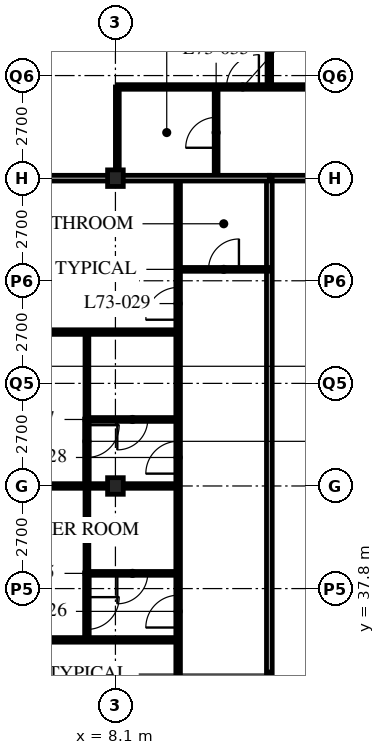
"""IFC4 building model, lengths in metres.
Left out: names, types, materials, properties, quantities, classifications, styles, units other than length and angle.
Written with IfcOpenShell. Run it as: python <this file> out.ifc"""

import sys

from ifc_helpers import new_model, si_unit, direction, frame, frame_2d, origin, origin_2d, place, context, subcontext, project, spatial, rectangle, i_section, extrude, element, fill, save


model = new_model("IFC4")
c1 = context("Model", 3, precision=1e-05, world=origin(), true_north=direction((0.0, 1.0)))
c2 = subcontext(c1, "Body", "Model", "MODEL_VIEW")
j1 = project(units=[si_unit("LENGTHUNIT", "METRE"), si_unit("PLANEANGLEUNIT", "RADIAN")], contexts=[c1])
p1 = place(None, origin())
s1 = spatial("IfcSite", under=j1, at=p1, CompositionType="ELEMENT")
p2 = place(p1, origin())
s2 = spatial("IfcBuilding", under=s1, at=p2, CompositionType="ELEMENT")
p3 = place(p2, frame((0.0, 0.0, 285.3)))
s3 = spatial("IfcBuildingStorey", under=s2, at=p3, CompositionType="ELEMENT", Elevation=285.3)
for number, where, z_axis, x_axis in (
    (1, (8.1, 40.5, 0.0), (0.0, 0.0, 1.0), (1.0, 0.0, 0.0)),
    (2, (8.1, 48.6, 0.0), (0.0, 0.0, 1.0), (1.0, 0.0, 0.0)),
):
    element("IfcColumn", number, at=place(p3, frame(where, z_axis=z_axis, x_axis=x_axis)), inside=s3, PredefinedType="COLUMN", context=c2, shape_type="SweptSolid", body=[
        extrude(i_section(OverallWidth=0.412, OverallDepth=0.437, WebThickness=0.036, FlangeThickness=0.058, FilletRadius=0.015, at=origin_2d()), origin(), (0.0, 0.0, 1.0), 3.9),
    ])
p4 = place(p3, frame((12.15, 48.6, 0.0), z_axis=(0.0, 0.0, 1.0), x_axis=(1.0, 0.0, 0.0)))
e3 = element("IfcWall", 3, at=p4, inside=s3, PredefinedType="PARTITIONING", context=c2, shape_type="SweptSolid", body=[
    extrude(rectangle(XDim=24.3, YDim=0.15, at=frame_2d((12.15, 0.0))), origin(), (0.0, 0.0, 1.0), 3.078),
])
p5 = place(p4, frame((4.95, 0.0, 0.0)))
e4 = element("IfcOpeningElement", 4, at=p5, cuts=e3, PredefinedType="OPENING", context=c2, shape_type="SweptSolid", body=[
    extrude(rectangle(XDim=1.0, YDim=2.1, at=frame_2d((0.5, 1.05))), frame((0.0, 0.085, 0.0), z_axis=(0.0, -1.0, 0.0), x_axis=(1.0, 0.0, 0.0)), (0.0, 0.0, 1.0), 0.17),
])
p6 = place(p4, frame((16.6, 0.0, 0.0)))
e5 = element("IfcOpeningElement", 5, at=p6, cuts=e3, PredefinedType="OPENING", context=c2, shape_type="SweptSolid", body=[
    extrude(rectangle(XDim=1.0, YDim=2.1, at=frame_2d((0.5, 1.05))), frame((0.0, 0.085, 0.0), z_axis=(0.0, -1.0, 0.0), x_axis=(1.0, 0.0, 0.0)), (0.0, 0.0, 1.0), 0.17),
])
p7 = place(p4, frame((1.525, 0.0, 0.0)))
e6 = element("IfcOpeningElement", 6, at=p7, cuts=e3, PredefinedType="OPENING", context=c2, shape_type="SweptSolid", body=[
    extrude(rectangle(XDim=1.0, YDim=2.1, at=frame_2d((0.5, 1.05))), frame((0.0, 0.085, 0.0), z_axis=(0.0, -1.0, 0.0), x_axis=(1.0, 0.0, 0.0)), (0.0, 0.0, 1.0), 0.17),
])
p8 = place(p3, frame((12.15, 22.5, 0.0), z_axis=(0.0, 0.0, 1.0), x_axis=(0.0, 1.0, 0.0)))
e7 = element("IfcWall", 7, at=p8, inside=s3, PredefinedType="PARTITIONING", context=c2, shape_type="SweptSolid", body=[
    extrude(rectangle(XDim=26.1, YDim=0.15, at=frame_2d((13.05, 0.0))), origin(), (0.0, 0.0, 1.0), 3.69),
])
p9 = place(p8, frame((0.4, 0.0, 0.0)))
e8 = element("IfcOpeningElement", 8, at=p9, cuts=e7, PredefinedType="OPENING", context=c2, shape_type="SweptSolid", body=[
    extrude(rectangle(XDim=1.0, YDim=2.1, at=frame_2d((0.5, 1.05))), frame((0.0, 0.085, 0.0), z_axis=(0.0, -1.0, 0.0), x_axis=(1.0, 0.0, 0.0)), (0.0, 0.0, 1.0), 0.17),
])
p10 = place(p3, frame((9.75, 22.5, 0.0), z_axis=(0.0, 0.0, 1.0), x_axis=(0.0, 1.0, 0.0)))
e9 = element("IfcWall", 9, at=p10, inside=s3, PredefinedType="PARTITIONING", context=c2, shape_type="SweptSolid", body=[
    extrude(rectangle(XDim=26.1, YDim=0.12, at=frame_2d((13.05, 0.0))), origin(), (0.0, 0.0, 1.0), 3.69),
])
p11 = place(p10, frame((0.975, 0.0, 0.0)))
e10 = element("IfcOpeningElement", 10, at=p11, cuts=e9, PredefinedType="OPENING", context=c2, shape_type="SweptSolid", body=[
    extrude(rectangle(XDim=0.85, YDim=2.1, at=frame_2d((0.425, 1.05))), frame((0.0, 0.07, 0.0), z_axis=(0.0, -1.0, 0.0), x_axis=(1.0, 0.0, 0.0)), (0.0, 0.0, 1.0), 0.14),
])
p12 = place(p10, frame((10.225, 0.0, 0.0)))
e11 = element("IfcOpeningElement", 11, at=p12, cuts=e9, PredefinedType="OPENING", context=c2, shape_type="SweptSolid", body=[
    extrude(rectangle(XDim=0.85, YDim=2.1, at=frame_2d((0.425, 1.05))), frame((0.0, 0.07, 0.0), z_axis=(0.0, -1.0, 0.0), x_axis=(1.0, 0.0, 0.0)), (0.0, 0.0, 1.0), 0.14),
])
p13 = place(p10, frame((14.275, 0.0, 0.0)))
e12 = element("IfcOpeningElement", 12, at=p13, cuts=e9, PredefinedType="OPENING", context=c2, shape_type="SweptSolid", body=[
    extrude(rectangle(XDim=0.85, YDim=2.1, at=frame_2d((0.425, 1.05))), frame((0.0, 0.07, 0.0), z_axis=(0.0, -1.0, 0.0), x_axis=(1.0, 0.0, 0.0)), (0.0, 0.0, 1.0), 0.14),
])
p14 = place(p10, frame((18.325, 0.0, 0.0)))
e13 = element("IfcOpeningElement", 13, at=p14, cuts=e9, PredefinedType="OPENING", context=c2, shape_type="SweptSolid", body=[
    extrude(rectangle(XDim=0.85, YDim=2.1, at=frame_2d((0.425, 1.05))), frame((0.0, 0.07, 0.0), z_axis=(0.0, -1.0, 0.0), x_axis=(1.0, 0.0, 0.0)), (0.0, 0.0, 1.0), 0.14),
])
p15 = place(p10, frame((22.375, 0.0, 0.0)))
e14 = element("IfcOpeningElement", 14, at=p15, cuts=e9, PredefinedType="OPENING", context=c2, shape_type="SweptSolid", body=[
    extrude(rectangle(XDim=0.85, YDim=2.1, at=frame_2d((0.425, 1.05))), frame((0.0, 0.07, 0.0), z_axis=(0.0, -1.0, 0.0), x_axis=(1.0, 0.0, 0.0)), (0.0, 0.0, 1.0), 0.14),
])
p16 = place(p3, frame((12.15, 46.2, 0.0), z_axis=(0.0, 0.0, 1.0), x_axis=(-1.0, 0.0, 0.0)))
e15 = element("IfcWall", 15, at=p16, inside=s3, PredefinedType="PARTITIONING", context=c2, shape_type="SweptSolid", body=[
    extrude(rectangle(XDim=2.4, YDim=0.1, at=frame_2d((1.2, 0.0))), origin(), (0.0, 0.0, 1.0), 3.69),
])
p17 = place(p16, frame((0.8, 0.0, 0.0)))
e16 = element("IfcOpeningElement", 16, at=p17, cuts=e15, PredefinedType="OPENING", context=c2, shape_type="SweptSolid", body=[
    extrude(rectangle(XDim=0.8, YDim=2.1, at=frame_2d((0.4, 1.05))), frame((0.0, 0.06, 0.0), z_axis=(0.0, -1.0, 0.0), x_axis=(1.0, 0.0, 0.0)), (0.0, 0.0, 1.0), 0.12),
])
p18 = place(p3, frame((9.75, 38.2, 0.0), z_axis=(0.0, 0.0, 1.0), x_axis=(-1.0, 0.0, 0.0)))
e17 = element("IfcWall", 17, at=p18, inside=s3, PredefinedType="PARTITIONING", context=c2, shape_type="SweptSolid", body=[
    extrude(rectangle(XDim=2.4, YDim=0.1, at=frame_2d((1.2, 0.0))), origin(), (0.0, 0.0, 1.0), 3.69),
])
p19 = place(p18, frame((0.8, 0.0, 0.0)))
e18 = element("IfcOpeningElement", 18, at=p19, cuts=e17, PredefinedType="OPENING", context=c2, shape_type="SweptSolid", body=[
    extrude(rectangle(XDim=0.8, YDim=2.1, at=frame_2d((0.4, 1.05))), frame((0.0, 0.06, 0.0), z_axis=(0.0, -1.0, 0.0), x_axis=(1.0, 0.0, 0.0)), (0.0, 0.0, 1.0), 0.12),
])
p20 = place(p3, frame((7.35, 38.2, 0.0), z_axis=(0.0, 0.0, 1.0), x_axis=(0.0, 1.0, 0.0)))
e19 = element("IfcWall", 19, at=p20, inside=s3, PredefinedType="PARTITIONING", context=c2, shape_type="SweptSolid", body=[
    extrude(rectangle(XDim=2.3, YDim=0.1, at=frame_2d((1.15, 0.0))), origin(), (0.0, 0.0, 1.0), 3.69),
])
p21 = place(p3, frame((9.75, 36.45, 0.0), z_axis=(0.0, 0.0, 1.0), x_axis=(-1.0, 0.0, 0.0)))
e20 = element("IfcWall", 20, at=p21, inside=s3, PredefinedType="PARTITIONING", context=c2, shape_type="SweptSolid", body=[
    extrude(rectangle(XDim=9.45, YDim=0.12, at=frame_2d((4.725, 0.0))), origin(), (0.0, 0.0, 1.0), 3.69),
])
p22 = place(p3, frame((9.75, 42.25, 0.0), z_axis=(0.0, 0.0, 1.0), x_axis=(-1.0, 0.0, 0.0)))
e21 = element("IfcWall", 21, at=p22, inside=s3, PredefinedType="PARTITIONING", context=c2, shape_type="SweptSolid", body=[
    extrude(rectangle(XDim=2.4, YDim=0.1, at=frame_2d((1.2, 0.0))), origin(), (0.0, 0.0, 1.0), 3.69),
])
p23 = place(p22, frame((0.8, 0.0, 0.0)))
e22 = element("IfcOpeningElement", 22, at=p23, cuts=e21, PredefinedType="OPENING", context=c2, shape_type="SweptSolid", body=[
    extrude(rectangle(XDim=0.8, YDim=2.1, at=frame_2d((0.4, 1.05))), frame((0.0, 0.06, 0.0), z_axis=(0.0, -1.0, 0.0), x_axis=(1.0, 0.0, 0.0)), (0.0, 0.0, 1.0), 0.12),
])
p24 = place(p3, frame((7.35, 42.25, 0.0), z_axis=(0.0, 0.0, 1.0), x_axis=(0.0, 1.0, 0.0)))
e23 = element("IfcWall", 23, at=p24, inside=s3, PredefinedType="PARTITIONING", context=c2, shape_type="SweptSolid", body=[
    extrude(rectangle(XDim=2.3, YDim=0.1, at=frame_2d((1.15, 0.0))), origin(), (0.0, 0.0, 1.0), 3.69),
])
p25 = place(p3, frame((9.75, 40.5, 0.0), z_axis=(0.0, 0.0, 1.0), x_axis=(-1.0, 0.0, 0.0)))
e24 = element("IfcWall", 24, at=p25, inside=s3, PredefinedType="PARTITIONING", context=c2, shape_type="SweptSolid", body=[
    extrude(rectangle(XDim=9.45, YDim=0.12, at=frame_2d((4.725, 0.0))), origin(), (0.0, 0.0, 1.0), 3.078),
])
p26 = place(p3, frame((9.75, 44.55, 0.0), z_axis=(0.0, 0.0, 1.0), x_axis=(-1.0, 0.0, 0.0)))
e25 = element("IfcWall", 25, at=p26, inside=s3, PredefinedType="PARTITIONING", context=c2, shape_type="SweptSolid", body=[
    extrude(rectangle(XDim=9.45, YDim=0.12, at=frame_2d((4.725, 0.0))), origin(), (0.0, 0.0, 1.0), 3.69),
])
p27 = place(p3, frame((10.75, 48.6, 0.0), z_axis=(0.0, 0.0, 1.0), x_axis=(0.0, 1.0, 0.0)))
e26 = element("IfcWall", 26, at=p27, inside=s3, PredefinedType="PARTITIONING", context=c2, shape_type="SweptSolid", body=[
    extrude(rectangle(XDim=2.4, YDim=0.1, at=frame_2d((1.2, 0.0))), origin(), (0.0, 0.0, 1.0), 3.69),
])
p28 = place(p27, frame((0.8, 0.0, 0.0)))
e27 = element("IfcOpeningElement", 27, at=p28, cuts=e26, PredefinedType="OPENING", context=c2, shape_type="SweptSolid", body=[
    extrude(rectangle(XDim=0.8, YDim=2.1, at=frame_2d((0.4, 1.05))), frame((0.0, 0.06, 0.0), z_axis=(0.0, -1.0, 0.0), x_axis=(1.0, 0.0, 0.0)), (0.0, 0.0, 1.0), 0.12),
])
p29 = place(p3, frame((8.15, 48.6, 0.0), z_axis=(0.0, 0.0, 1.0), x_axis=(0.0, 1.0, 0.0)))
e28 = element("IfcWall", 28, at=p29, inside=s3, PredefinedType="PARTITIONING", context=c2, shape_type="SweptSolid", body=[
    extrude(rectangle(XDim=2.4, YDim=0.1, at=frame_2d((1.2, 0.0))), origin(), (0.0, 0.0, 1.0), 3.078),
])
p30 = place(p3, frame((8.15, 51.0, 0.0), z_axis=(0.0, 0.0, 1.0), x_axis=(1.0, 0.0, 0.0)))
e29 = element("IfcWall", 29, at=p30, inside=s3, PredefinedType="PARTITIONING", context=c2, shape_type="SweptSolid", body=[
    extrude(rectangle(XDim=28.3, YDim=0.12, at=frame_2d((14.15, 0.0))), origin(), (0.0, 0.0, 1.0), 3.69),
])
p31 = place(p30, frame((9.025, 0.0, 0.0)))
e30 = element("IfcOpeningElement", 30, at=p31, cuts=e29, PredefinedType="OPENING", context=c2, shape_type="SweptSolid", body=[
    extrude(rectangle(XDim=0.85, YDim=2.1, at=frame_2d((0.425, 1.05))), frame((0.0, 0.07, 0.0), z_axis=(0.0, -1.0, 0.0), x_axis=(1.0, 0.0, 0.0)), (0.0, 0.0, 1.0), 0.14),
])
p32 = place(p30, frame((16.475, 0.0, 0.0)))
e31 = element("IfcOpeningElement", 31, at=p32, cuts=e29, PredefinedType="OPENING", context=c2, shape_type="SweptSolid", body=[
    extrude(rectangle(XDim=0.85, YDim=2.1, at=frame_2d((0.425, 1.05))), frame((0.0, 0.07, 0.0), z_axis=(0.0, -1.0, 0.0), x_axis=(1.0, 0.0, 0.0)), (0.0, 0.0, 1.0), 0.14),
])
p33 = place(p30, frame((21.175, 0.0, 0.0)))
e32 = element("IfcOpeningElement", 32, at=p33, cuts=e29, PredefinedType="OPENING", context=c2, shape_type="SweptSolid", body=[
    extrude(rectangle(XDim=0.85, YDim=2.1, at=frame_2d((0.425, 1.05))), frame((0.0, 0.07, 0.0), z_axis=(0.0, -1.0, 0.0), x_axis=(1.0, 0.0, 0.0)), (0.0, 0.0, 1.0), 0.14),
])
p34 = place(p30, frame((24.575, 0.0, 0.0)))
e33 = element("IfcOpeningElement", 33, at=p34, cuts=e29, PredefinedType="OPENING", context=c2, shape_type="SweptSolid", body=[
    extrude(rectangle(XDim=0.85, YDim=2.1, at=frame_2d((0.425, 1.05))), frame((0.0, 0.07, 0.0), z_axis=(0.0, -1.0, 0.0), x_axis=(1.0, 0.0, 0.0)), (0.0, 0.0, 1.0), 0.14),
])
p35 = place(p30, frame((6.725, 0.0, 0.0)))
e34 = element("IfcOpeningElement", 34, at=p35, cuts=e29, PredefinedType="OPENING", context=c2, shape_type="SweptSolid", body=[
    extrude(rectangle(XDim=0.85, YDim=2.1, at=frame_2d((0.425, 1.05))), frame((0.0, 0.07, 0.0), z_axis=(0.0, -1.0, 0.0), x_axis=(1.0, 0.0, 0.0)), (0.0, 0.0, 1.0), 0.14),
])
p36 = place(p30, frame((2.875, 0.0, 0.0)))
e35 = element("IfcOpeningElement", 35, at=p36, cuts=e29, PredefinedType="OPENING", context=c2, shape_type="SweptSolid", body=[
    extrude(rectangle(XDim=0.85, YDim=2.1, at=frame_2d((0.425, 1.05))), frame((0.0, 0.07, 0.0), z_axis=(0.0, -1.0, 0.0), x_axis=(1.0, 0.0, 0.0)), (0.0, 0.0, 1.0), 0.14),
])
p37 = place(p3, frame((12.15, 51.0, 0.0), z_axis=(0.0, 0.0, 1.0), x_axis=(0.0, 1.0, 0.0)))
e36 = element("IfcWall", 36, at=p37, inside=s3, PredefinedType="PARTITIONING", context=c2, shape_type="SweptSolid", body=[
    extrude(rectangle(XDim=13.5, YDim=0.12, at=frame_2d((6.75, 0.0))), origin(), (0.0, 0.0, 1.0), 3.69),
])
p38 = place(p3, frame((0.3, 48.6, 0.0), z_axis=(0.0, 0.0, 1.0), x_axis=(1.0, 0.0, 0.0)))
e37 = element("IfcWall", 37, at=p38, inside=s3, PredefinedType="PARTITIONING", context=c2, shape_type="SweptSolid", body=[
    extrude(rectangle(XDim=11.85, YDim=0.15, at=frame_2d((5.925, 0.0))), origin(), (0.0, 0.0, 1.0), 3.078),
])
p39 = place(p3, frame((7.35, 36.45, 0.0), z_axis=(0.0, 0.0, 1.0), x_axis=(0.0, 1.0, 0.0)))
e38 = element("IfcWall", 38, at=p39, inside=s3, PredefinedType="PARTITIONING", context=c2, shape_type="SweptSolid", body=[
    extrude(rectangle(XDim=1.76, YDim=0.12, at=frame_2d((0.88, 0.0))), origin(), (0.0, 0.0, 1.0), 3.69),
])
p40 = place(p39, frame((0.275, 0.0, 0.0)))
e39 = element("IfcOpeningElement", 39, at=p40, cuts=e38, PredefinedType="OPENING", context=c2, shape_type="SweptSolid", body=[
    extrude(rectangle(XDim=0.85, YDim=2.1, at=frame_2d((0.425, 1.05))), frame((0.0, 0.07, 0.0), z_axis=(0.0, -1.0, 0.0), x_axis=(1.0, 0.0, 0.0)), (0.0, 0.0, 1.0), 0.14),
])
p41 = place(p3, frame((7.35, 40.5, 0.0), z_axis=(0.0, 0.0, 1.0), x_axis=(0.0, 1.0, 0.0)))
e40 = element("IfcWall", 40, at=p41, inside=s3, PredefinedType="PARTITIONING", context=c2, shape_type="SweptSolid", body=[
    extrude(rectangle(XDim=1.76, YDim=0.12, at=frame_2d((0.88, 0.0))), origin(), (0.0, 0.0, 1.0), 3.69),
])
p42 = place(p41, frame((0.75, 0.0, 0.0)))
e41 = element("IfcOpeningElement", 41, at=p42, cuts=e40, PredefinedType="OPENING", context=c2, shape_type="SweptSolid", body=[
    extrude(rectangle(XDim=0.85, YDim=2.1, at=frame_2d((0.425, 1.05))), frame((0.0, 0.07, 0.0), z_axis=(0.0, -1.0, 0.0), x_axis=(1.0, 0.0, 0.0)), (0.0, 0.0, 1.0), 0.14),
])
p43 = place(p17, origin())
e42 = element("IfcDoor", 42, at=p43, inside=s3, OperationType="SINGLE_SWING_RIGHT", PredefinedType="DOOR", context=c2, shape_type="SweptSolid", body=[
    extrude(rectangle(XDim=0.8, YDim=2.1, at=frame_2d((0.4, 1.05))), frame((0.0, 0.025, 0.0), z_axis=(0.0, -1.0, 0.0), x_axis=(1.0, 0.0, 0.0)), (0.0, 0.0, 1.0), 0.05),
])
fill(e16, e42)
p44 = place(p19, origin())
e43 = element("IfcDoor", 43, at=p44, inside=s3, OperationType="SINGLE_SWING_RIGHT", PredefinedType="DOOR", context=c2, shape_type="SweptSolid", body=[
    extrude(rectangle(XDim=0.8, YDim=2.1, at=frame_2d((0.4, 1.05))), frame((0.0, 0.025, 0.0), z_axis=(0.0, -1.0, 0.0), x_axis=(1.0, 0.0, 0.0)), (0.0, 0.0, 1.0), 0.05),
])
fill(e18, e43)
p45 = place(p13, origin())
e44 = element("IfcDoor", 44, at=p45, inside=s3, OperationType="SINGLE_SWING_LEFT", PredefinedType="DOOR", context=c2, shape_type="SweptSolid", body=[
    extrude(rectangle(XDim=0.85, YDim=2.1, at=frame_2d((0.425, 1.05))), frame((0.0, 0.025, 0.0), z_axis=(0.0, -1.0, 0.0), x_axis=(1.0, 0.0, 0.0)), (0.0, 0.0, 1.0), 0.05),
])
fill(e12, e44)
p46 = place(p23, origin())
e45 = element("IfcDoor", 45, at=p46, inside=s3, OperationType="SINGLE_SWING_RIGHT", PredefinedType="DOOR", context=c2, shape_type="SweptSolid", body=[
    extrude(rectangle(XDim=0.8, YDim=2.1, at=frame_2d((0.4, 1.05))), frame((0.0, 0.025, 0.0), z_axis=(0.0, -1.0, 0.0), x_axis=(1.0, 0.0, 0.0)), (0.0, 0.0, 1.0), 0.05),
])
fill(e22, e45)
p47 = place(p14, origin())
e46 = element("IfcDoor", 46, at=p47, inside=s3, OperationType="SINGLE_SWING_LEFT", PredefinedType="DOOR", context=c2, shape_type="SweptSolid", body=[
    extrude(rectangle(XDim=0.85, YDim=2.1, at=frame_2d((0.425, 1.05))), frame((0.0, 0.025, 0.0), z_axis=(0.0, -1.0, 0.0), x_axis=(1.0, 0.0, 0.0)), (0.0, 0.0, 1.0), 0.05),
])
fill(e13, e46)
p48 = place(p15, origin())
e47 = element("IfcDoor", 47, at=p48, inside=s3, OperationType="SINGLE_SWING_LEFT", PredefinedType="DOOR", context=c2, shape_type="SweptSolid", body=[
    extrude(rectangle(XDim=0.85, YDim=2.1, at=frame_2d((0.425, 1.05))), frame((0.0, 0.025, 0.0), z_axis=(0.0, -1.0, 0.0), x_axis=(1.0, 0.0, 0.0)), (0.0, 0.0, 1.0), 0.05),
])
fill(e14, e47)
p49 = place(p28, origin())
e48 = element("IfcDoor", 48, at=p49, inside=s3, OperationType="SINGLE_SWING_LEFT", PredefinedType="DOOR", context=c2, shape_type="SweptSolid", body=[
    extrude(rectangle(XDim=0.8, YDim=2.1, at=frame_2d((0.4, 1.05))), frame((0.0, 0.025, 0.0), z_axis=(0.0, -1.0, 0.0), x_axis=(1.0, 0.0, 0.0)), (0.0, 0.0, 1.0), 0.05),
])
fill(e27, e48)
p50 = place(p36, origin())
e49 = element("IfcDoor", 49, at=p50, inside=s3, OperationType="SINGLE_SWING_RIGHT", PredefinedType="DOOR", context=c2, shape_type="SweptSolid", body=[
    extrude(rectangle(XDim=0.85, YDim=2.1, at=frame_2d((0.425, 1.05))), frame((0.0, 0.025, 0.0), z_axis=(0.0, -1.0, 0.0), x_axis=(1.0, 0.0, 0.0)), (0.0, 0.0, 1.0), 0.05),
])
fill(e35, e49)
p51 = place(p40, origin())
e50 = element("IfcDoor", 50, at=p51, inside=s3, OperationType="SINGLE_SWING_LEFT", PredefinedType="DOOR", context=c2, shape_type="SweptSolid", body=[
    extrude(rectangle(XDim=0.85, YDim=2.1, at=frame_2d((0.425, 1.05))), frame((0.0, 0.025, 0.0), z_axis=(0.0, -1.0, 0.0), x_axis=(1.0, 0.0, 0.0)), (0.0, 0.0, 1.0), 0.05),
])
fill(e39, e50)
p52 = place(p42, origin())
e51 = element("IfcDoor", 51, at=p52, inside=s3, OperationType="SINGLE_SWING_LEFT", PredefinedType="DOOR", context=c2, shape_type="SweptSolid", body=[
    extrude(rectangle(XDim=0.85, YDim=2.1, at=frame_2d((0.425, 1.05))), frame((0.0, 0.025, 0.0), z_axis=(0.0, -1.0, 0.0), x_axis=(1.0, 0.0, 0.0)), (0.0, 0.0, 1.0), 0.05),
])
fill(e41, e51)
save(model, sys.argv[1])
